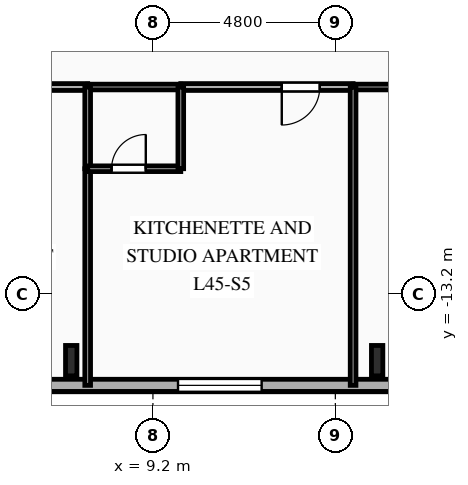
"""IFC4 building model, lengths in metres.
Left out: names, types, materials, properties, quantities, classifications, styles, units other than length and angle.
Written with IfcOpenShell. Run it as: python <this file> out.ifc"""

import sys

from ifc_helpers import new_model, si_unit, direction, frame, frame_2d, origin, origin_2d, place, context, subcontext, project, spatial, rectangle, i_section, extrude, element, fill, save


model = new_model("IFC4")
c1 = context("Model", 3, precision=1e-05, world=origin(), true_north=direction((0.0, 1.0)))
c2 = subcontext(c1, "Body", "Model", "MODEL_VIEW")
j1 = project(units=[si_unit("LENGTHUNIT", "METRE"), si_unit("PLANEANGLEUNIT", "RADIAN")], contexts=[c1])
p1 = place(None, origin())
s1 = spatial("IfcSite", under=j1, at=p1, CompositionType="ELEMENT")
p2 = place(p1, origin())
s2 = spatial("IfcBuilding", under=s1, at=p2, CompositionType="ELEMENT")
p3 = place(p2, frame((0.0, 0.0, 161.15)))
s3 = spatial("IfcBuildingStorey", under=s2, at=p3, CompositionType="ELEMENT", Elevation=161.15)
for number, where, z_axis, x_axis in (
    (1, (7.05, -14.95, 0.0), (0.0, 0.0, 1.0), (1.0, 0.0, 0.0)),
    (2, (15.1, -14.95, 0.0), (0.0, 0.0, 1.0), (1.0, 0.0, 0.0)),
):
    element("IfcColumn", number, at=place(p3, frame(where, z_axis=z_axis, x_axis=x_axis)), inside=s3, PredefinedType="COLUMN", context=c2, shape_type="SweptSolid", body=[
        extrude(i_section(OverallWidth=0.3, OverallDepth=0.8, WebThickness=0.018, FlangeThickness=0.033, FilletRadius=0.03, at=origin_2d()), origin(), (0.0, 0.0, 1.0), 3.35),
    ])
p4 = place(p3, frame((23.8, -15.6, 0.0), z_axis=(0.0, 0.0, 1.0), x_axis=(-1.0, 0.0, 0.0)))
e3 = element("IfcWall", 3, at=p4, inside=s3, PredefinedType="SOLIDWALL", context=c2, shape_type="SweptSolid", body=[
    extrude(rectangle(XDim=49.6, YDim=0.32, at=frame_2d((24.8, 0.0))), origin(), (0.0, 0.0, 1.0), 3.04),
])
p5 = place(p4, frame((1.13, 0.0, 0.85)))
e4 = element("IfcOpeningElement", 4, at=p5, cuts=e3, PredefinedType="OPENING", context=c2, shape_type="SweptSolid", body=[
    extrude(rectangle(XDim=1.1, YDim=1.85, at=frame_2d((0.55, 0.925))), frame((0.0, 0.17, 0.0), z_axis=(0.0, -1.0, 0.0), x_axis=(1.0, 0.0, 0.0)), (0.0, 0.0, 1.0), 0.34),
])
p6 = place(p4, frame((5.295, 0.0, 0.85)))
e5 = element("IfcOpeningElement", 5, at=p6, cuts=e3, PredefinedType="OPENING", context=c2, shape_type="SweptSolid", body=[
    extrude(rectangle(XDim=1.65, YDim=1.85, at=frame_2d((0.825, 0.925))), frame((0.0, 0.17, 0.0), z_axis=(0.0, -1.0, 0.0), x_axis=(1.0, 0.0, 0.0)), (0.0, 0.0, 1.0), 0.34),
])
p7 = place(p4, frame((11.74, 0.0, 0.85)))
e6 = element("IfcOpeningElement", 6, at=p7, cuts=e3, PredefinedType="OPENING", context=c2, shape_type="SweptSolid", body=[
    extrude(rectangle(XDim=2.2, YDim=1.85, at=frame_2d((1.1, 0.925))), frame((0.0, 0.17, 0.0), z_axis=(0.0, -1.0, 0.0), x_axis=(1.0, 0.0, 0.0)), (0.0, 0.0, 1.0), 0.34),
])
p8 = place(p4, frame((18.74, 0.0, 0.85)))
e7 = element("IfcOpeningElement", 7, at=p8, cuts=e3, PredefinedType="OPENING", context=c2, shape_type="SweptSolid", body=[
    extrude(rectangle(XDim=2.2, YDim=1.85, at=frame_2d((1.1, 0.925))), frame((0.0, 0.17, 0.0), z_axis=(0.0, -1.0, 0.0), x_axis=(1.0, 0.0, 0.0)), (0.0, 0.0, 1.0), 0.34),
])
p9 = place(p4, frame((25.74, 0.0, 0.85)))
e8 = element("IfcOpeningElement", 8, at=p9, cuts=e3, PredefinedType="OPENING", context=c2, shape_type="SweptSolid", body=[
    extrude(rectangle(XDim=2.2, YDim=1.85, at=frame_2d((1.1, 0.925))), frame((0.0, 0.17, 0.0), z_axis=(0.0, -1.0, 0.0), x_axis=(1.0, 0.0, 0.0)), (0.0, 0.0, 1.0), 0.34),
])
p10 = place(p4, frame((33.348, 0.0, 0.85)))
e9 = element("IfcOpeningElement", 9, at=p10, cuts=e3, PredefinedType="OPENING", context=c2, shape_type="SweptSolid", body=[
    extrude(rectangle(XDim=2.2, YDim=1.85, at=frame_2d((1.1, 0.925))), frame((0.0, 0.17, 0.0), z_axis=(0.0, -1.0, 0.0), x_axis=(1.0, 0.0, 0.0)), (0.0, 0.0, 1.0), 0.34),
])
p11 = place(p4, frame((38.972, 0.0, 0.85)))
e10 = element("IfcOpeningElement", 10, at=p11, cuts=e3, PredefinedType="OPENING", context=c2, shape_type="SweptSolid", body=[
    extrude(rectangle(XDim=1.65, YDim=1.85, at=frame_2d((0.825, 0.925))), frame((0.0, 0.17, 0.0), z_axis=(0.0, -1.0, 0.0), x_axis=(1.0, 0.0, 0.0)), (0.0, 0.0, 1.0), 0.34),
])
p12 = place(p4, frame((45.895, 0.0, 0.85)))
e11 = element("IfcOpeningElement", 11, at=p12, cuts=e3, PredefinedType="OPENING", context=c2, shape_type="SweptSolid", body=[
    extrude(rectangle(XDim=1.65, YDim=1.85, at=frame_2d((0.825, 0.925))), frame((0.0, 0.17, 0.0), z_axis=(0.0, -1.0, 0.0), x_axis=(1.0, 0.0, 0.0)), (0.0, 0.0, 1.0), 0.34),
])
p13 = place(p3, frame((7.483, -7.75, 0.0), z_axis=(0.0, 0.0, 1.0), x_axis=(-1.0, 0.0, 0.0)))
e12 = element("IfcWall", 12, at=p13, inside=s3, PredefinedType="PARTITIONING", context=c2, shape_type="SweptSolid", body=[
    extrude(rectangle(XDim=4.533, YDim=0.18, at=frame_2d((2.267, 0.0))), origin(), (0.0, 0.0, 1.0), 3.04),
])
p14 = place(p13, frame((2.656, 0.0, 0.0)))
e13 = element("IfcOpeningElement", 13, at=p14, cuts=e12, PredefinedType="OPENING", context=c2, shape_type="SweptSolid", body=[
    extrude(rectangle(XDim=1.0, YDim=2.15, at=frame_2d((0.5, 1.075))), frame((0.0, 0.1, 0.0), z_axis=(0.0, -1.0, 0.0), x_axis=(1.0, 0.0, 0.0)), (0.0, 0.0, 1.0), 0.2),
])
p15 = place(p3, frame((14.467, -7.75, 0.0), z_axis=(0.0, 0.0, 1.0), x_axis=(-1.0, 0.0, 0.0)))
e14 = element("IfcWall", 14, at=p15, inside=s3, PredefinedType="PARTITIONING", context=c2, shape_type="SweptSolid", body=[
    extrude(rectangle(XDim=4.534, YDim=0.18, at=frame_2d((2.267, 0.0))), origin(), (0.0, 0.0, 1.0), 3.04),
])
p16 = place(p15, frame((0.877, 0.0, 0.0)))
e15 = element("IfcOpeningElement", 15, at=p16, cuts=e14, PredefinedType="OPENING", context=c2, shape_type="SweptSolid", body=[
    extrude(rectangle(XDim=1.0, YDim=2.15, at=frame_2d((0.5, 1.075))), frame((0.0, 0.1, 0.0), z_axis=(0.0, -1.0, 0.0), x_axis=(1.0, 0.0, 0.0)), (0.0, 0.0, 1.0), 0.2),
])
p17 = place(p3, frame((9.933, -7.75, 0.0), z_axis=(0.0, 0.0, 1.0), x_axis=(-1.0, 0.0, 0.0)))
e16 = element("IfcWall", 16, at=p17, inside=s3, PredefinedType="PLUMBINGWALL", context=c2, shape_type="SweptSolid", body=[
    extrude(rectangle(XDim=2.45, YDim=0.15, at=frame_2d((1.225, 0.0))), origin(), (0.0, 0.0, 1.0), 3.04),
])
p18 = place(p3, frame((20.95, -7.75, 0.0), z_axis=(0.0, 0.0, 1.0), x_axis=(-1.0, 0.0, 0.0)))
e17 = element("IfcWall", 17, at=p18, inside=s3, PredefinedType="PARTITIONING", context=c2, shape_type="SweptSolid", body=[
    extrude(rectangle(XDim=6.483, YDim=0.15, at=frame_2d((3.241, 0.0))), origin(), (0.0, 0.0, 1.0), 3.04),
])
p19 = place(p18, frame((4.319, 0.0, 0.0)))
e18 = element("IfcOpeningElement", 18, at=p19, cuts=e17, PredefinedType="OPENING", context=c2, shape_type="SweptSolid", body=[
    extrude(rectangle(XDim=1.05, YDim=2.15, at=frame_2d((0.525, 1.075))), frame((0.0, 0.085, 0.0), z_axis=(0.0, -1.0, 0.0), x_axis=(1.0, 0.0, 0.0)), (0.0, 0.0, 1.0), 0.17),
])
p20 = place(p3, frame((7.483, -9.9, 0.0), z_axis=(0.0, 0.0, 1.0), x_axis=(0.0, -1.0, 0.0)))
e19 = element("IfcWall", 19, at=p20, inside=s3, PredefinedType="PARTITIONING", context=c2, shape_type="SweptSolid", body=[
    extrude(rectangle(XDim=5.7, YDim=0.15, at=frame_2d((2.85, 0.0))), origin(), (0.0, 0.0, 1.0), 2.525),
])
p21 = place(p3, frame((7.483, -7.75, 0.0), z_axis=(0.0, 0.0, 1.0), x_axis=(0.0, -1.0, 0.0)))
e20 = element("IfcWall", 20, at=p21, inside=s3, PredefinedType="PLUMBINGWALL", context=c2, shape_type="SweptSolid", body=[
    extrude(rectangle(XDim=2.15, YDim=0.15, at=frame_2d((1.075, 0.0))), origin(), (0.0, 0.0, 1.0), 3.04),
])
p22 = place(p3, frame((7.483, -9.9, 0.0), z_axis=(0.0, 0.0, 1.0), x_axis=(1.0, 0.0, 0.0)))
e21 = element("IfcWall", 21, at=p22, inside=s3, PredefinedType="PLUMBINGWALL", context=c2, shape_type="SweptSolid", body=[
    extrude(rectangle(XDim=2.45, YDim=0.15, at=frame_2d((1.225, 0.0))), origin(), (0.0, 0.0, 1.0), 3.04),
])
p23 = place(p22, frame((0.629, 0.0, 0.0)))
e22 = element("IfcOpeningElement", 22, at=p23, cuts=e21, PredefinedType="OPENING", context=c2, shape_type="SweptSolid", body=[
    extrude(rectangle(XDim=0.9, YDim=2.1, at=frame_2d((0.45, 1.05))), frame((0.0, 0.085, 0.0), z_axis=(0.0, -1.0, 0.0), x_axis=(1.0, 0.0, 0.0)), (0.0, 0.0, 1.0), 0.17),
])
p24 = place(p3, frame((9.933, -9.9, 0.0), z_axis=(0.0, 0.0, 1.0), x_axis=(0.0, 1.0, 0.0)))
e23 = element("IfcWall", 23, at=p24, inside=s3, PredefinedType="PLUMBINGWALL", context=c2, shape_type="SweptSolid", body=[
    extrude(rectangle(XDim=2.15, YDim=0.15, at=frame_2d((1.075, 0.0))), origin(), (0.0, 0.0, 1.0), 3.04),
])
p25 = place(p3, frame((14.467, -7.75, 0.0), z_axis=(0.0, 0.0, 1.0), x_axis=(0.0, -1.0, 0.0)))
e24 = element("IfcWall", 24, at=p25, inside=s3, PredefinedType="PARTITIONING", context=c2, shape_type="SweptSolid", body=[
    extrude(rectangle(XDim=7.85, YDim=0.15, at=frame_2d((3.925, 0.0))), origin(), (0.0, 0.0, 1.0), 3.04),
])
p26 = place(p7, origin())
e25 = element("IfcWindow", 25, at=p26, inside=s3, PartitioningType="SINGLE_PANEL", PredefinedType="WINDOW", context=c2, shape_type="SweptSolid", body=[
    extrude(rectangle(XDim=2.2, YDim=1.85, at=frame_2d((1.1, 0.925))), frame((0.0, 0.03, 0.0), z_axis=(0.0, -1.0, 0.0), x_axis=(1.0, 0.0, 0.0)), (0.0, 0.0, 1.0), 0.06),
])
fill(e6, e25)
p27 = place(p16, origin())
e26 = element("IfcDoor", 26, at=p27, inside=s3, OperationType="SINGLE_SWING_RIGHT", PredefinedType="DOOR", context=c2, shape_type="SweptSolid", body=[
    extrude(rectangle(XDim=1.0, YDim=2.15, at=frame_2d((0.5, 1.075))), frame((0.0, 0.025, 0.0), z_axis=(0.0, -1.0, 0.0), x_axis=(1.0, 0.0, 0.0)), (0.0, 0.0, 1.0), 0.05),
])
fill(e15, e26)
p28 = place(p23, origin())
e27 = element("IfcDoor", 27, at=p28, inside=s3, OperationType="SINGLE_SWING_RIGHT", PredefinedType="DOOR", context=c2, shape_type="SweptSolid", body=[
    extrude(rectangle(XDim=0.9, YDim=2.1, at=frame_2d((0.45, 1.05))), frame((0.0, 0.025, 0.0), z_axis=(0.0, -1.0, 0.0), x_axis=(1.0, 0.0, 0.0)), (0.0, 0.0, 1.0), 0.05),
])
fill(e22, e27)
save(model, sys.argv[1])
